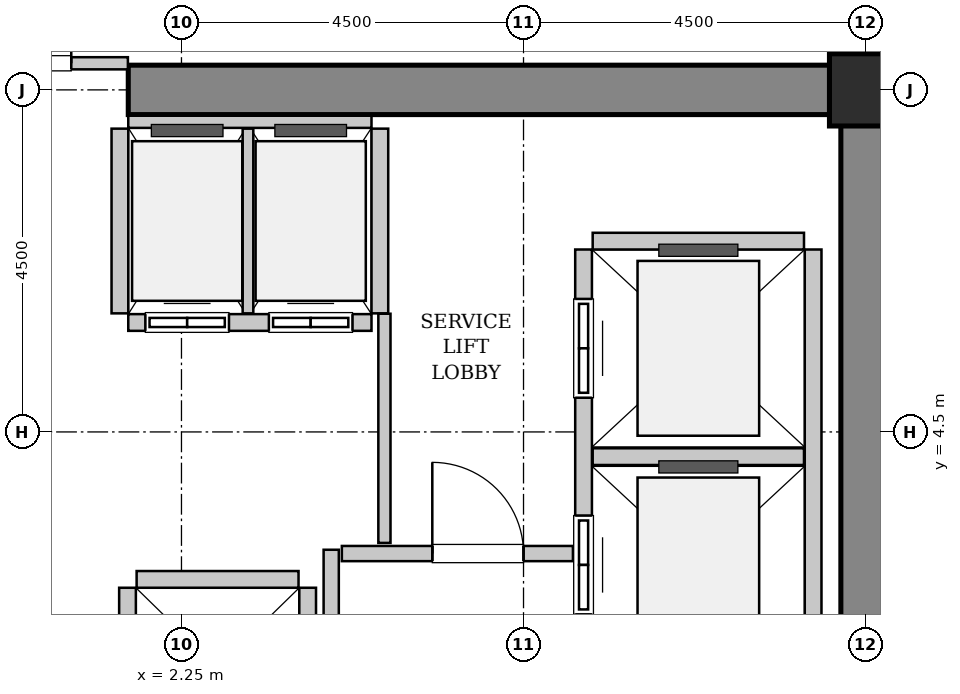
"""IFC4 building model, lengths in metres.
Left out: names, types, materials, properties, quantities, classifications, styles, units other than length and angle.
Written with IfcOpenShell. Run it as: python <this file> out.ifc"""

import sys

from ifc_helpers import new_model, si_unit, direction, frame, frame_2d, origin, origin_2d, place, context, subcontext, project, spatial, rectangle, hollow_rectangle, extrude, source, transform, mapped, element, fill, save


model = new_model("IFC4")
c1 = context("Model", 3, precision=1e-05, world=origin(), true_north=direction((0.0, 1.0)))
c2 = subcontext(c1, "Body", "Model", "MODEL_VIEW")
j1 = project(units=[si_unit("LENGTHUNIT", "METRE"), si_unit("PLANEANGLEUNIT", "RADIAN")], contexts=[c1])
p1 = place(None, origin())
s1 = spatial("IfcSite", under=j1, at=p1, CompositionType="ELEMENT")
p2 = place(p1, origin())
s2 = spatial("IfcBuilding", under=s1, at=p2, CompositionType="ELEMENT")
p3 = place(p2, frame((0.0, 0.0, 74.8)))
s3 = spatial("IfcBuildingStorey", under=s2, at=p3, CompositionType="ELEMENT", Elevation=74.8)
m1 = source(origin(), c2, "Body", "SweptSolid", [
    extrude(rectangle(XDim=10.025, YDim=0.65, at=frame_2d((5.012, 0.0))), origin(), (0.0, 0.0, 1.0), 3.8),
])
p4 = place(p3, frame((1.55, 9.0, 0.0), z_axis=(0.0, 0.0, 1.0), x_axis=(1.0, 0.0, 0.0)))
e1 = element("IfcWall", 1, at=p4, inside=s3, PredefinedType="SHEAR", context=c2, shape_type="MappedRepresentation", body=[
    mapped(m1, transform((0.0, 0.0, 0.0), x_axis=(1.0, 0.0, 0.0), y_axis=(0.0, 1.0, 0.0), z_axis=(0.0, 0.0, 1.0), scale=1.0)),
])
m2 = source(origin(), c2, "Body", "SweptSolid", [
    extrude(rectangle(XDim=7.325, YDim=0.65, at=frame_2d((3.663, 0.0))), origin(), (0.0, 0.0, 1.0), 3.8),
])
p5 = place(p3, frame((11.25, 1.35, 0.0), z_axis=(0.0, 0.0, 1.0), x_axis=(0.0, 1.0, 0.0)))
e2 = element("IfcWall", 2, at=p5, inside=s3, PredefinedType="SHEAR", context=c2, shape_type="MappedRepresentation", body=[
    mapped(m2, transform((0.0, 0.0, 0.0), x_axis=(1.0, 0.0, 0.0), y_axis=(0.0, 1.0, 0.0), z_axis=(0.0, 0.0, 1.0), scale=1.0)),
])
m3 = source(origin(), c2, "Body", "SweptSolid", [
    extrude(hollow_rectangle(XDim=0.95, YDim=0.95, WallThickness=0.045, InnerFilletRadius=0.045, OuterFilletRadius=0.09, at=origin_2d()), origin(), (0.0, 0.0, 1.0), 3.8),
])
p6 = place(p3, frame((11.25, 9.0, 0.0), z_axis=(0.0, 0.0, 1.0), x_axis=(1.0, 0.0, 0.0)))
e3 = element("IfcColumn", 3, at=p6, inside=s3, PredefinedType="COLUMN", context=c2, shape_type="MappedRepresentation", body=[
    mapped(m3, transform((0.0, 0.0, 0.0), x_axis=(1.0, 0.0, 0.0), y_axis=(0.0, 1.0, 0.0), z_axis=(0.0, 0.0, 1.0), scale=1.0)),
])
m4 = source(origin(), c2, "Body", "SweptSolid", [
    extrude(rectangle(XDim=5.45, YDim=0.22, at=frame_2d((2.725, 0.0))), origin(), (0.0, 0.0, 1.0), 3.535),
])
p7 = place(p3, frame((7.54, 6.9, 0.0), z_axis=(0.0, 0.0, 1.0), x_axis=(0.0, -1.0, 0.0)))
e4 = element("IfcWall", 4, at=p7, inside=s3, PredefinedType="SOLIDWALL", context=c2, shape_type="MappedRepresentation", body=[
    mapped(m4, transform((0.0, 0.0, 0.0), x_axis=(1.0, 0.0, 0.0), y_axis=(0.0, 1.0, 0.0), z_axis=(0.0, 0.0, 1.0), scale=1.0)),
])
p8 = place(p7, frame((3.5, 0.0, 0.0)))
e5 = element("IfcOpeningElement", 5, at=p8, cuts=e4, PredefinedType="OPENING", context=c2, shape_type="SweptSolid", body=[
    extrude(rectangle(XDim=1.3, YDim=2.3, at=frame_2d((0.65, 1.15))), frame((0.0, 0.12, 0.0), z_axis=(0.0, -1.0, 0.0), x_axis=(1.0, 0.0, 0.0)), (0.0, 0.0, 1.0), 0.24),
])
p9 = place(p7, frame((0.65, 0.0, 0.0)))
e6 = element("IfcOpeningElement", 6, at=p9, cuts=e4, PredefinedType="OPENING", context=c2, shape_type="SweptSolid", body=[
    extrude(rectangle(XDim=1.3, YDim=2.3, at=frame_2d((0.65, 1.15))), frame((0.0, 0.12, 0.0), z_axis=(0.0, -1.0, 0.0), x_axis=(1.0, 0.0, 0.0)), (0.0, 0.0, 1.0), 0.24),
])
p10 = place(p3, frame((10.56, 1.45, 0.0), z_axis=(0.0, 0.0, 1.0), x_axis=(0.0, 1.0, 0.0)))
e7 = element("IfcWall", 7, at=p10, inside=s3, PredefinedType="SOLIDWALL", context=c2, shape_type="MappedRepresentation", body=[
    mapped(m4, transform((0.0, 0.0, 0.0), x_axis=(1.0, 0.0, 0.0), y_axis=(0.0, 1.0, 0.0), z_axis=(0.0, 0.0, 1.0), scale=1.0)),
])
m5 = source(origin(), c2, "Body", "SweptSolid", [
    extrude(rectangle(XDim=2.78, YDim=0.22, at=frame_2d((1.39, 0.0))), origin(), (0.0, 0.0, 1.0), 3.535),
])
for number, where, z_axis, x_axis in (
    (8, (7.66, 4.175, 0.0), (0.0, 0.0, 1.0), (1.0, 0.0, 0.0)),
    (9, (10.44, 7.01, 0.0), (0.0, 0.0, 1.0), (-1.0, 0.0, 0.0)),
):
    element("IfcWall", number, at=place(p3, frame(where, z_axis=z_axis, x_axis=x_axis)), inside=s3, PredefinedType="SOLIDWALL", context=c2, shape_type="MappedRepresentation", body=[
        mapped(m5, transform((0.0, 0.0, 0.0), x_axis=(1.0, 0.0, 0.0), y_axis=(0.0, 1.0, 0.0), z_axis=(0.0, 0.0, 1.0), scale=1.0)),
    ])
m6 = source(origin(), c2, "Body", "SweptSolid", [
    extrude(rectangle(XDim=3.2, YDim=0.22, at=frame_2d((1.6, 0.0))), origin(), (0.0, 0.0, 1.0), 3.535),
])
p11 = place(p3, frame((1.55, 5.94, 0.0), z_axis=(0.0, 0.0, 1.0), x_axis=(1.0, 0.0, 0.0)))
e10 = element("IfcWall", 10, at=p11, inside=s3, PredefinedType="SOLIDWALL", context=c2, shape_type="MappedRepresentation", body=[
    mapped(m6, transform((0.0, 0.0, 0.0), x_axis=(1.0, 0.0, 0.0), y_axis=(0.0, 1.0, 0.0), z_axis=(0.0, 0.0, 1.0), scale=1.0)),
])
p12 = place(p11, frame((0.225, 0.0, 0.0)))
e11 = element("IfcOpeningElement", 11, at=p12, cuts=e10, PredefinedType="OPENING", context=c2, shape_type="SweptSolid", body=[
    extrude(rectangle(XDim=1.1, YDim=2.2, at=frame_2d((0.55, 1.1))), frame((0.0, 0.12, 0.0), z_axis=(0.0, -1.0, 0.0), x_axis=(1.0, 0.0, 0.0)), (0.0, 0.0, 1.0), 0.24),
])
p13 = place(p11, frame((1.85, 0.0, 0.0)))
e12 = element("IfcOpeningElement", 12, at=p13, cuts=e10, PredefinedType="OPENING", context=c2, shape_type="SweptSolid", body=[
    extrude(rectangle(XDim=1.1, YDim=2.2, at=frame_2d((0.55, 1.1))), frame((0.0, 0.12, 0.0), z_axis=(0.0, -1.0, 0.0), x_axis=(1.0, 0.0, 0.0)), (0.0, 0.0, 1.0), 0.24),
])
m7 = source(origin(), c2, "Body", "SweptSolid", [
    extrude(rectangle(XDim=3.2, YDim=0.16, at=frame_2d((1.6, 0.0))), origin(), (0.0, 0.0, 1.0), 2.425),
])
p14 = place(p3, frame((4.75, 8.58, 0.0), z_axis=(0.0, 0.0, 1.0), x_axis=(-1.0, 0.0, 0.0)))
e13 = element("IfcWall", 13, at=p14, inside=s3, PredefinedType="PARTITIONING", context=c2, shape_type="MappedRepresentation", body=[
    mapped(m7, transform((0.0, 0.0, 0.0), x_axis=(1.0, 0.0, 0.0), y_axis=(0.0, 1.0, 0.0), z_axis=(0.0, 0.0, 1.0), scale=1.0)),
])
m8 = source(origin(), c2, "Body", "SweptSolid", [
    extrude(rectangle(XDim=2.43, YDim=0.22, at=frame_2d((1.215, 0.0))), origin(), (0.0, 0.0, 1.0), 3.535),
])
p15 = place(p3, frame((1.44, 8.49, 0.0), z_axis=(0.0, 0.0, 1.0), x_axis=(0.0, -1.0, 0.0)))
e14 = element("IfcWall", 14, at=p15, inside=s3, PredefinedType="SOLIDWALL", context=c2, shape_type="MappedRepresentation", body=[
    mapped(m8, transform((0.0, 0.0, 0.0), x_axis=(1.0, 0.0, 0.0), y_axis=(0.0, 1.0, 0.0), z_axis=(0.0, 0.0, 1.0), scale=1.0)),
])
m9 = source(origin(), c2, "Body", "SweptSolid", [
    extrude(rectangle(XDim=2.43, YDim=0.14, at=frame_2d((1.215, 0.0))), origin(), (0.0, 0.0, 1.0), 3.535),
])
p16 = place(p3, frame((3.125, 6.06, 0.0), z_axis=(0.0, 0.0, 1.0), x_axis=(0.0, 1.0, 0.0)))
e15 = element("IfcWall", 15, at=p16, inside=s3, PredefinedType="PARTITIONING", context=c2, shape_type="MappedRepresentation", body=[
    mapped(m9, transform((0.0, 0.0, 0.0), x_axis=(1.0, 0.0, 0.0), y_axis=(0.0, 1.0, 0.0), z_axis=(0.0, 0.0, 1.0), scale=1.0)),
])
p17 = place(p3, frame((4.86, 6.06, 0.0), z_axis=(0.0, 0.0, 1.0), x_axis=(0.0, 1.0, 0.0)))
e16 = element("IfcWall", 16, at=p17, inside=s3, PredefinedType="SOLIDWALL", context=c2, shape_type="MappedRepresentation", body=[
    mapped(m8, transform((0.0, 0.0, 0.0), x_axis=(1.0, 0.0, 0.0), y_axis=(0.0, 1.0, 0.0), z_axis=(0.0, 0.0, 1.0), scale=1.0)),
])
m10 = source(origin(), c2, "Body", "SweptSolid", [
    extrude(rectangle(XDim=4.9, YDim=0.22, at=frame_2d((2.45, 0.0))), origin(), (0.0, 0.0, 1.0), 3.535),
])
for number, where, z_axis, x_axis in (
    (17, (1.54, 2.45, 0.0), (0.0, 0.0, 1.0), (0.0, -1.0, 0.0)),
    (18, (3.91, -2.45, 0.0), (0.0, 0.0, 1.0), (0.0, 1.0, 0.0)),
):
    element("IfcWall", number, at=place(p3, frame(where, z_axis=z_axis, x_axis=x_axis)), inside=s3, PredefinedType="SOLIDWALL", context=c2, shape_type="MappedRepresentation", body=[
        mapped(m10, transform((0.0, 0.0, 0.0), x_axis=(1.0, 0.0, 0.0), y_axis=(0.0, 1.0, 0.0), z_axis=(0.0, 0.0, 1.0), scale=1.0)),
    ])
m11 = source(origin(), c2, "Body", "SweptSolid", [
    extrude(rectangle(XDim=2.13, YDim=0.22, at=frame_2d((1.065, 0.0))), origin(), (0.0, 0.0, 1.0), 3.535),
])
p18 = place(p3, frame((3.79, 2.56, 0.0), z_axis=(0.0, 0.0, 1.0), x_axis=(-1.0, 0.0, 0.0)))
e19 = element("IfcWall", 19, at=p18, inside=s3, PredefinedType="SOLIDWALL", context=c2, shape_type="MappedRepresentation", body=[
    mapped(m11, transform((0.0, 0.0, 0.0), x_axis=(1.0, 0.0, 0.0), y_axis=(0.0, 1.0, 0.0), z_axis=(0.0, 0.0, 1.0), scale=1.0)),
])
m12 = source(origin(), c2, "Body", "SweptSolid", [
    extrude(rectangle(XDim=5.9, YDim=0.2, at=frame_2d((2.95, 0.0))), origin(), (0.0, 0.0, 1.0), 3.535),
])
p19 = place(p3, frame((4.22, -2.95, 0.0), z_axis=(0.0, 0.0, 1.0), x_axis=(0.0, 1.0, 0.0)))
e20 = element("IfcWall", 20, at=p19, inside=s3, PredefinedType="PARTITIONING", context=c2, shape_type="MappedRepresentation", body=[
    mapped(m12, transform((0.0, 0.0, 0.0), x_axis=(1.0, 0.0, 0.0), y_axis=(0.0, 1.0, 0.0), z_axis=(0.0, 0.0, 1.0), scale=1.0)),
])
m13 = source(origin(), c2, "Body", "SweptSolid", [
    extrude(rectangle(XDim=3.04, YDim=0.2, at=frame_2d((1.52, 0.0))), origin(), (0.0, 0.0, 1.0), 3.535),
])
p20 = place(p3, frame((4.36, 2.9, 0.0), z_axis=(0.0, 0.0, 1.0), x_axis=(1.0, 0.0, 0.0)))
e21 = element("IfcWall", 21, at=p20, inside=s3, PredefinedType="PARTITIONING", context=c2, shape_type="MappedRepresentation", body=[
    mapped(m13, transform((0.0, 0.0, 0.0), x_axis=(1.0, 0.0, 0.0), y_axis=(0.0, 1.0, 0.0), z_axis=(0.0, 0.0, 1.0), scale=1.0)),
])
p21 = place(p20, frame((1.19, 0.0, 0.0)))
e22 = element("IfcOpeningElement", 22, at=p21, cuts=e21, PredefinedType="OPENING", context=c2, shape_type="SweptSolid", body=[
    extrude(rectangle(XDim=1.2, YDim=2.15, at=frame_2d((0.6, 1.075))), frame((0.0, 0.11, 0.0), z_axis=(0.0, -1.0, 0.0), x_axis=(1.0, 0.0, 0.0)), (0.0, 0.0, 1.0), 0.22),
])
m14 = source(origin(), c2, "Body", "SweptSolid", [
    extrude(rectangle(XDim=3.09, YDim=0.16, at=frame_2d((1.545, 0.0))), origin(), (0.0, 0.0, 1.0), 2.425),
])
p22 = place(p3, frame((-1.545, 9.35, 0.0), z_axis=(0.0, 0.0, 1.0), x_axis=(1.0, 0.0, 0.0)))
e23 = element("IfcWall", 23, at=p22, inside=s3, PredefinedType="PARTITIONING", context=c2, shape_type="MappedRepresentation", body=[
    mapped(m14, transform((0.0, 0.0, 0.0), x_axis=(1.0, 0.0, 0.0), y_axis=(0.0, 1.0, 0.0), z_axis=(0.0, 0.0, 1.0), scale=1.0)),
])
p23 = place(p22, frame((0.745, 0.0, 0.0)))
e24 = element("IfcOpeningElement", 24, at=p23, cuts=e23, PredefinedType="OPENING", context=c2, shape_type="SweptSolid", body=[
    extrude(rectangle(XDim=1.6, YDim=2.3, at=frame_2d((0.8, 1.15))), frame((0.0, 0.09, 0.0), z_axis=(0.0, -1.0, 0.0), x_axis=(1.0, 0.0, 0.0)), (0.0, 0.0, 1.0), 0.18),
])
m15 = source(origin(), c2, "Body", "SweptSolid", [
    extrude(rectangle(XDim=3.015, YDim=0.16, at=frame_2d((1.507, 0.0))), origin(), (0.0, 0.0, 1.0), 3.535),
])
p24 = place(p3, frame((4.92, 3.04, 0.0), z_axis=(0.0, 0.0, 1.0), x_axis=(0.0, 1.0, 0.0)))
e25 = element("IfcWall", 25, at=p24, inside=s3, PredefinedType="PARTITIONING", context=c2, shape_type="MappedRepresentation", body=[
    mapped(m15, transform((0.0, 0.0, 0.0), x_axis=(1.0, 0.0, 0.0), y_axis=(0.0, 1.0, 0.0), z_axis=(0.0, 0.0, 1.0), scale=1.0)),
])
m16 = source(origin(), c2, "Body", "SweptSolid", [
    extrude(rectangle(XDim=1.3, YDim=2.3, at=frame_2d((0.65, 1.15))), frame((0.0, 0.025, 0.0), z_axis=(0.0, -1.0, 0.0), x_axis=(1.0, 0.0, 0.0)), (0.0, 0.0, 1.0), 0.05),
])
p25 = place(p8, origin())
e26 = element("IfcDoor", 26, at=p25, inside=s3, OperationType="SLIDING_TO_RIGHT", PredefinedType="DOOR", context=c2, shape_type="MappedRepresentation", body=[
    mapped(m16, transform((0.0, 0.0, 0.0), x_axis=(1.0, 0.0, 0.0), y_axis=(0.0, 1.0, 0.0), z_axis=(0.0, 0.0, 1.0), scale=1.0)),
])
fill(e5, e26)
p26 = place(p9, origin())
e27 = element("IfcDoor", 27, at=p26, inside=s3, OperationType="SLIDING_TO_RIGHT", PredefinedType="DOOR", context=c2, shape_type="MappedRepresentation", body=[
    mapped(m16, transform((0.0, 0.0, 0.0), x_axis=(1.0, 0.0, 0.0), y_axis=(0.0, 1.0, 0.0), z_axis=(0.0, 0.0, 1.0), scale=1.0)),
])
fill(e6, e27)
m17 = source(origin(), c2, "Body", "SweptSolid", [
    extrude(rectangle(XDim=1.1, YDim=2.2, at=frame_2d((0.55, 1.1))), frame((0.0, 0.025, 0.0), z_axis=(0.0, -1.0, 0.0), x_axis=(1.0, 0.0, 0.0)), (0.0, 0.0, 1.0), 0.05),
])
p27 = place(p12, origin())
e28 = element("IfcDoor", 28, at=p27, inside=s3, OperationType="DOUBLE_DOOR_SLIDING", PredefinedType="DOOR", context=c2, shape_type="MappedRepresentation", body=[
    mapped(m17, transform((0.0, 0.0, 0.0), x_axis=(1.0, 0.0, 0.0), y_axis=(0.0, 1.0, 0.0), z_axis=(0.0, 0.0, 1.0), scale=1.0)),
])
fill(e11, e28)
p28 = place(p13, origin())
e29 = element("IfcDoor", 29, at=p28, inside=s3, OperationType="DOUBLE_DOOR_SLIDING", PredefinedType="DOOR", context=c2, shape_type="MappedRepresentation", body=[
    mapped(m17, transform((0.0, 0.0, 0.0), x_axis=(1.0, 0.0, 0.0), y_axis=(0.0, 1.0, 0.0), z_axis=(0.0, 0.0, 1.0), scale=1.0)),
])
fill(e12, e29)
m18 = source(origin(), c2, "Body", "SweptSolid", [
    extrude(rectangle(XDim=1.2, YDim=2.15, at=frame_2d((0.6, 1.075))), frame((0.0, 0.025, 0.0), z_axis=(0.0, -1.0, 0.0), x_axis=(1.0, 0.0, 0.0)), (0.0, 0.0, 1.0), 0.05),
])
p29 = place(p21, origin())
e30 = element("IfcDoor", 30, at=p29, inside=s3, OperationType="SINGLE_SWING_LEFT", PredefinedType="DOOR", context=c2, shape_type="MappedRepresentation", body=[
    mapped(m18, transform((0.0, 0.0, 0.0), x_axis=(1.0, 0.0, 0.0), y_axis=(0.0, 1.0, 0.0), z_axis=(0.0, 0.0, 1.0), scale=1.0)),
])
fill(e22, e30)
m19 = source(origin(), c2, "Body", "SweptSolid", [
    extrude(rectangle(XDim=1.6, YDim=2.3, at=frame_2d((0.8, 1.15))), frame((0.0, 0.025, 0.0), z_axis=(0.0, -1.0, 0.0), x_axis=(1.0, 0.0, 0.0)), (0.0, 0.0, 1.0), 0.05),
])
p30 = place(p23, origin())
e31 = element("IfcDoor", 31, at=p30, inside=s3, OperationType="DOUBLE_DOOR_SINGLE_SWING", PredefinedType="DOOR", context=c2, shape_type="MappedRepresentation", body=[
    mapped(m19, transform((0.0, 0.0, 0.0), x_axis=(1.0, 0.0, 0.0), y_axis=(0.0, 1.0, 0.0), z_axis=(0.0, 0.0, 1.0), scale=1.0)),
])
fill(e24, e31)
save(model, sys.argv[1])
